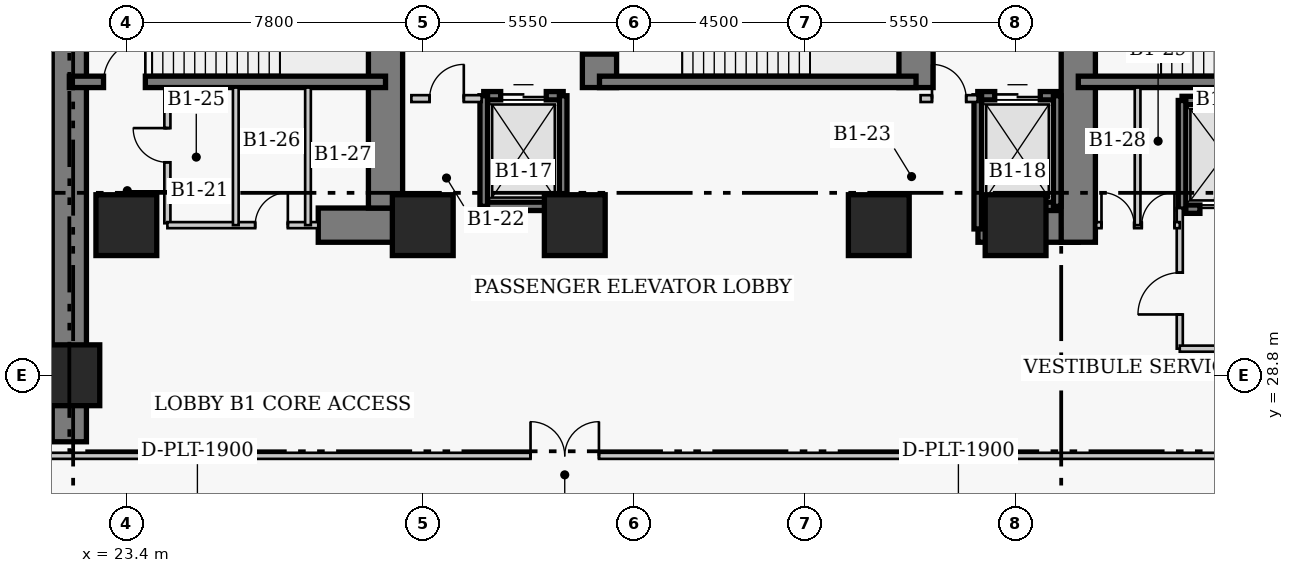
"""IFC4 building model, lengths in metres.
Left out: names, types, materials, properties, quantities, classifications, styles, units other than length and angle.
Written with IfcOpenShell. Run it as: python <this file> out.ifc"""

import sys

from ifc_helpers import new_model, si_unit, direction, frame, frame_2d, origin, origin_2d, place, context, subcontext, project, spatial, rectangle, extrude, element, fill, save


model = new_model("IFC4")
c1 = context("Model", 3, precision=1e-05, world=origin(), true_north=direction((0.0, 1.0)))
c2 = subcontext(c1, "Body", "Model", "MODEL_VIEW")
j1 = project(units=[si_unit("LENGTHUNIT", "METRE"), si_unit("PLANEANGLEUNIT", "RADIAN")], contexts=[c1])
p1 = place(None, origin())
s1 = spatial("IfcSite", under=j1, at=p1, CompositionType="ELEMENT")
p2 = place(p1, origin())
s2 = spatial("IfcBuilding", under=s1, at=p2, CompositionType="ELEMENT")
p3 = place(p2, frame((0.0, 0.0, -4.5)))
s3 = spatial("IfcBuildingStorey", under=s2, at=p3, CompositionType="ELEMENT", Elevation=-4.5)
p4 = place(p3, frame((21.9, 27.05, 0.0), z_axis=(0.0, 0.0, 1.0), x_axis=(0.0, 1.0, 0.0)))
e1 = element("IfcWall", 1, at=p4, inside=s3, PredefinedType="SHEAR", context=c2, shape_type="SweptSolid", body=[
    extrude(rectangle(XDim=13.72, YDim=0.9, at=frame_2d((6.86, 0.0))), origin(), (0.0, 0.0, 1.0), 4.5),
])
p5 = place(p3, frame((28.45, 32.75, 0.0), z_axis=(0.0, 0.0, 1.0), x_axis=(1.0, 0.0, 0.0)))
e2 = element("IfcWall", 2, at=p5, inside=s3, PredefinedType="SHEAR", context=c2, shape_type="SweptSolid", body=[
    extrude(rectangle(XDim=2.4, YDim=0.9, at=frame_2d((1.2, 0.0))), origin(), (0.0, 0.0, 1.0), 4.5),
])
p6 = place(p3, frame((45.81, 32.75, 0.0), z_axis=(0.0, 0.0, 1.0), x_axis=(1.0, 0.0, 0.0)))
e3 = element("IfcWall", 3, at=p6, inside=s3, PredefinedType="SHEAR", context=c2, shape_type="SweptSolid", body=[
    extrude(rectangle(XDim=2.64, YDim=0.9, at=frame_2d((1.32, 0.0))), origin(), (0.0, 0.0, 1.0), 4.5),
])
p7 = place(p3, frame((30.22, 33.2, 0.0), z_axis=(0.0, 0.0, 1.0), x_axis=(0.0, 1.0, 0.0)))
e4 = element("IfcWall", 4, at=p7, inside=s3, PredefinedType="SHEAR", context=c2, shape_type="SweptSolid", body=[
    extrude(rectangle(XDim=7.12, YDim=0.9, at=frame_2d((3.56, 0.0))), origin(), (0.0, 0.0, 1.0), 4.5),
])
p8 = place(p3, frame((35.85, 36.37, 0.0), z_axis=(0.0, 0.0, 1.0), x_axis=(0.0, 1.0, 0.0)))
e5 = element("IfcWall", 5, at=p8, inside=s3, PredefinedType="SHEAR", context=c2, shape_type="SweptSolid", body=[
    extrude(rectangle(XDim=3.95, YDim=0.9, at=frame_2d((1.975, 0.0))), origin(), (0.0, 0.0, 1.0), 4.5),
])
p9 = place(p8, frame((0.88, 0.0, 0.0)))
e6 = element("IfcOpeningElement", 6, at=p9, cuts=e5, PredefinedType="OPENING", context=c2, shape_type="SweptSolid", body=[
    extrude(rectangle(XDim=1.1, YDim=2.15, at=frame_2d((0.55, 1.075))), frame((0.0, 0.46, 0.0), z_axis=(0.0, -1.0, 0.0), x_axis=(1.0, 0.0, 0.0)), (0.0, 0.0, 1.0), 0.92),
])
p10 = place(p3, frame((44.18, 36.37, 0.0), z_axis=(0.0, 0.0, 1.0), x_axis=(0.0, 1.0, 0.0)))
e7 = element("IfcWall", 7, at=p10, inside=s3, PredefinedType="SHEAR", context=c2, shape_type="SweptSolid", body=[
    extrude(rectangle(XDim=3.95, YDim=0.9, at=frame_2d((1.975, 0.0))), origin(), (0.0, 0.0, 1.0), 4.5),
])
p11 = place(p3, frame((48.45, 32.3, 0.0), z_axis=(0.0, 0.0, 1.0), x_axis=(0.0, 1.0, 0.0)))
e8 = element("IfcWall", 8, at=p11, inside=s3, PredefinedType="SHEAR", context=c2, shape_type="SweptSolid", body=[
    extrude(rectangle(XDim=8.02, YDim=0.9, at=frame_2d((4.01, 0.0))), origin(), (0.0, 0.0, 1.0), 4.5),
])
p12 = place(p11, frame((5.9, 0.0, 0.0)))
e9 = element("IfcOpeningElement", 9, at=p12, cuts=e8, PredefinedType="OPENING", context=c2, shape_type="SweptSolid", body=[
    extrude(rectangle(XDim=1.1, YDim=2.15, at=frame_2d((0.55, 1.075))), frame((0.0, 0.46, 0.0), z_axis=(0.0, -1.0, 0.0), x_axis=(1.0, 0.0, 0.0)), (0.0, 0.0, 1.0), 0.92),
])
p13 = place(p3, frame((21.9, 36.52, 0.0), z_axis=(0.0, 0.0, 1.0), x_axis=(1.0, 0.0, 0.0)))
e10 = element("IfcWall", 10, at=p13, inside=s3, PredefinedType="SHEAR", context=c2, shape_type="SweptSolid", body=[
    extrude(rectangle(XDim=8.32, YDim=0.3, at=frame_2d((4.16, 0.0))), origin(), (0.0, 0.0, 1.0), 4.5),
])
p14 = place(p13, frame((0.9, 0.0, 0.0)))
e11 = element("IfcOpeningElement", 11, at=p14, cuts=e10, PredefinedType="OPENING", context=c2, shape_type="SweptSolid", body=[
    extrude(rectangle(XDim=1.1, YDim=2.15, at=frame_2d((0.55, 1.075))), frame((0.0, 0.16, 0.0), z_axis=(0.0, -1.0, 0.0), x_axis=(1.0, 0.0, 0.0)), (0.0, 0.0, 1.0), 0.32),
])
p15 = place(p3, frame((35.85, 36.52, 0.0), z_axis=(0.0, 0.0, 1.0), x_axis=(1.0, 0.0, 0.0)))
e12 = element("IfcWall", 12, at=p15, inside=s3, PredefinedType="SHEAR", context=c2, shape_type="SweptSolid", body=[
    extrude(rectangle(XDim=8.33, YDim=0.3, at=frame_2d((4.165, 0.0))), origin(), (0.0, 0.0, 1.0), 4.5),
])
p16 = place(p3, frame((48.45, 36.52, 0.0), z_axis=(0.0, 0.0, 1.0), x_axis=(1.0, 0.0, 0.0)))
e13 = element("IfcWall", 13, at=p16, inside=s3, PredefinedType="SHEAR", context=c2, shape_type="SweptSolid", body=[
    extrude(rectangle(XDim=8.52, YDim=0.3, at=frame_2d((4.26, 0.0))), origin(), (0.0, 0.0, 1.0), 4.5),
])
for number, where, z_axis, x_axis in (
    (14, (21.9, 28.8, 0.0), (0.0, 0.0, 1.0), (1.0, 0.0, 0.0)),
    (15, (23.4, 32.75, 0.0), (0.0, 0.0, 1.0), (1.0, 0.0, 0.0)),
    (16, (31.2, 32.75, 0.0), (0.0, 0.0, 1.0), (1.0, 0.0, 0.0)),
    (17, (35.2, 32.75, 0.0), (0.0, 0.0, 1.0), (1.0, 0.0, 0.0)),
    (18, (43.2, 32.75, 0.0), (0.0, 0.0, 1.0), (1.0, 0.0, 0.0)),
    (19, (46.8, 32.75, 0.0), (0.0, 0.0, 1.0), (1.0, 0.0, 0.0)),
):
    element("IfcColumn", number, at=place(p3, frame(where, z_axis=z_axis, x_axis=x_axis)), inside=s3, PredefinedType="COLUMN", context=c2, shape_type="SweptSolid", body=[
        extrude(rectangle(XDim=1.6, YDim=1.6, at=origin_2d()), origin(), (0.0, 0.0, 1.0), 4.5),
    ])
p17 = place(p3, frame((51.18, 36.03, 0.0), z_axis=(0.0, 0.0, 1.0), x_axis=(1.0, 0.0, 0.0)))
e20 = element("IfcWall", 20, at=p17, inside=s3, PredefinedType="SHEAR", context=c2, shape_type="SweptSolid", body=[
    extrude(rectangle(XDim=2.42, YDim=0.22, at=frame_2d((1.21, 0.0))), origin(), (0.0, 0.0, 1.0), 4.5),
])
p18 = place(p3, frame((51.18, 33.17, 0.0), z_axis=(0.0, 0.0, 1.0), x_axis=(1.0, 0.0, 0.0)))
e21 = element("IfcWall", 21, at=p18, inside=s3, PredefinedType="SHEAR", context=c2, shape_type="SweptSolid", body=[
    extrude(rectangle(XDim=2.42, YDim=0.22, at=frame_2d((1.21, 0.0))), origin(), (0.0, 0.0, 1.0), 4.5),
])
p19 = place(p18, frame((0.47, 0.0, 0.0)))
e22 = element("IfcOpeningElement", 22, at=p19, cuts=e21, PredefinedType="OPENING", context=c2, shape_type="SweptSolid", body=[
    extrude(rectangle(XDim=1.3, YDim=2.15, at=frame_2d((0.65, 1.075))), frame((0.0, 0.12, 0.0), z_axis=(0.0, -1.0, 0.0), x_axis=(1.0, 0.0, 0.0)), (0.0, 0.0, 1.0), 0.24),
])
p20 = place(p3, frame((51.18, 33.17, 0.0), z_axis=(0.0, 0.0, 1.0), x_axis=(0.0, 1.0, 0.0)))
e23 = element("IfcWall", 23, at=p20, inside=s3, PredefinedType="SHEAR", context=c2, shape_type="SweptSolid", body=[
    extrude(rectangle(XDim=2.86, YDim=0.2, at=frame_2d((1.43, 0.0))), origin(), (0.0, 0.0, 1.0), 4.5),
])
p21 = place(p3, frame((32.805, 36.155, 0.0), z_axis=(0.0, 0.0, 1.0), x_axis=(1.0, 0.0, 0.0)))
e24 = element("IfcWall", 24, at=p21, inside=s3, PredefinedType="SHEAR", context=c2, shape_type="SweptSolid", body=[
    extrude(rectangle(XDim=2.09, YDim=0.22, at=frame_2d((1.045, 0.0))), origin(), (0.0, 0.0, 1.0), 4.5),
])
p22 = place(p21, frame((0.445, 0.0, 0.0)))
e25 = element("IfcOpeningElement", 25, at=p22, cuts=e24, PredefinedType="OPENING", context=c2, shape_type="SweptSolid", body=[
    extrude(rectangle(XDim=1.2, YDim=2.15, at=frame_2d((0.6, 1.075))), frame((0.0, 0.12, 0.0), z_axis=(0.0, -1.0, 0.0), x_axis=(1.0, 0.0, 0.0)), (0.0, 0.0, 1.0), 0.24),
])
p23 = place(p3, frame((32.805, 33.245, 0.0), z_axis=(0.0, 0.0, 1.0), x_axis=(1.0, 0.0, 0.0)))
e26 = element("IfcWall", 26, at=p23, inside=s3, PredefinedType="SHEAR", context=c2, shape_type="SweptSolid", body=[
    extrude(rectangle(XDim=2.09, YDim=0.22, at=frame_2d((1.045, 0.0))), origin(), (0.0, 0.0, 1.0), 4.5),
])
for number, where, z_axis, x_axis in (
    (27, (32.805, 33.245, 0.0), (0.0, 0.0, 1.0), (0.0, 1.0, 0.0)),
    (28, (34.895, 33.245, 0.0), (0.0, 0.0, 1.0), (0.0, 1.0, 0.0)),
):
    element("IfcWall", number, at=place(p3, frame(where, z_axis=z_axis, x_axis=x_axis)), inside=s3, PredefinedType="SHEAR", context=c2, shape_type="SweptSolid", body=[
        extrude(rectangle(XDim=2.91, YDim=0.2, at=frame_2d((1.455, 0.0))), origin(), (0.0, 0.0, 1.0), 4.5),
    ])
p24 = place(p3, frame((45.805, 36.155, 0.0), z_axis=(0.0, 0.0, 1.0), x_axis=(1.0, 0.0, 0.0)))
e29 = element("IfcWall", 29, at=p24, inside=s3, PredefinedType="SHEAR", context=c2, shape_type="SweptSolid", body=[
    extrude(rectangle(XDim=2.09, YDim=0.22, at=frame_2d((1.045, 0.0))), origin(), (0.0, 0.0, 1.0), 4.5),
])
p25 = place(p24, frame((0.445, 0.0, 0.0)))
e30 = element("IfcOpeningElement", 30, at=p25, cuts=e29, PredefinedType="OPENING", context=c2, shape_type="SweptSolid", body=[
    extrude(rectangle(XDim=1.2, YDim=2.15, at=frame_2d((0.6, 1.075))), frame((0.0, 0.12, 0.0), z_axis=(0.0, -1.0, 0.0), x_axis=(1.0, 0.0, 0.0)), (0.0, 0.0, 1.0), 0.24),
])
p26 = place(p3, frame((45.805, 33.245, 0.0), z_axis=(0.0, 0.0, 1.0), x_axis=(1.0, 0.0, 0.0)))
e31 = element("IfcWall", 31, at=p26, inside=s3, PredefinedType="SHEAR", context=c2, shape_type="SweptSolid", body=[
    extrude(rectangle(XDim=2.09, YDim=0.22, at=frame_2d((1.045, 0.0))), origin(), (0.0, 0.0, 1.0), 4.5),
])
p27 = place(p3, frame((45.805, 32.65, 0.0), z_axis=(0.0, 0.0, 1.0), x_axis=(0.0, 1.0, 0.0)))
e32 = element("IfcWall", 32, at=p27, inside=s3, PredefinedType="SHEAR", context=c2, shape_type="SweptSolid", body=[
    extrude(rectangle(XDim=3.505, YDim=0.2, at=frame_2d((1.752, 0.0))), origin(), (0.0, 0.0, 1.0), 4.5),
])
p28 = place(p3, frame((47.895, 33.245, 0.0), z_axis=(0.0, 0.0, 1.0), x_axis=(0.0, 1.0, 0.0)))
e33 = element("IfcWall", 33, at=p28, inside=s3, PredefinedType="SHEAR", context=c2, shape_type="SweptSolid", body=[
    extrude(rectangle(XDim=2.91, YDim=0.2, at=frame_2d((1.455, 0.0))), origin(), (0.0, 0.0, 1.0), 4.5),
])
p29 = place(p3, frame((30.9, 36.08, 0.0), z_axis=(0.0, 0.0, 1.0), x_axis=(1.0, 0.0, 0.0)))
e34 = element("IfcWall", 34, at=p29, inside=s3, PredefinedType="PARTITIONING", context=c2, shape_type="SweptSolid", body=[
    extrude(rectangle(XDim=1.85, YDim=0.18, at=frame_2d((0.925, 0.0))), origin(), (0.0, 0.0, 1.0), 4.15),
])
p30 = place(p29, frame((0.48, 0.0, 0.0)))
e35 = element("IfcOpeningElement", 35, at=p30, cuts=e34, PredefinedType="OPENING", context=c2, shape_type="SweptSolid", body=[
    extrude(rectangle(XDim=0.9, YDim=2.15, at=frame_2d((0.45, 1.075))), frame((0.0, 0.1, 0.0), z_axis=(0.0, -1.0, 0.0), x_axis=(1.0, 0.0, 0.0)), (0.0, 0.0, 1.0), 0.2),
])
p31 = place(p3, frame((44.3, 36.08, 0.0), z_axis=(0.0, 0.0, 1.0), x_axis=(1.0, 0.0, 0.0)))
e36 = element("IfcWall", 36, at=p31, inside=s3, PredefinedType="PARTITIONING", context=c2, shape_type="SweptSolid", body=[
    extrude(rectangle(XDim=1.5, YDim=0.18, at=frame_2d((0.75, 0.0))), origin(), (0.0, 0.0, 1.0), 4.15),
])
p32 = place(p31, frame((0.3, 0.0, 0.0)))
e37 = element("IfcOpeningElement", 37, at=p32, cuts=e36, PredefinedType="OPENING", context=c2, shape_type="SweptSolid", body=[
    extrude(rectangle(XDim=0.9, YDim=2.15, at=frame_2d((0.45, 1.075))), frame((0.0, 0.1, 0.0), z_axis=(0.0, -1.0, 0.0), x_axis=(1.0, 0.0, 0.0)), (0.0, 0.0, 1.0), 0.2),
])
p33 = place(p3, frame((24.48, 32.8, 0.0), z_axis=(0.0, 0.0, 1.0), x_axis=(0.0, 1.0, 0.0)))
e38 = element("IfcWall", 38, at=p33, inside=s3, PredefinedType="PARTITIONING", context=c2, shape_type="SweptSolid", body=[
    extrude(rectangle(XDim=3.57, YDim=0.16, at=frame_2d((1.785, 0.0))), origin(), (0.0, 0.0, 1.0), 4.15),
])
p34 = place(p33, frame((1.604, 0.0, 0.0)))
e39 = element("IfcOpeningElement", 39, at=p34, cuts=e38, PredefinedType="OPENING", context=c2, shape_type="SweptSolid", body=[
    extrude(rectangle(XDim=0.9, YDim=2.1, at=frame_2d((0.45, 1.05))), frame((0.0, 0.09, 0.0), z_axis=(0.0, -1.0, 0.0), x_axis=(1.0, 0.0, 0.0)), (0.0, 0.0, 1.0), 0.18),
])
p35 = place(p3, frame((51.12, 29.5, 0.0), z_axis=(0.0, 0.0, 1.0), x_axis=(0.0, 1.0, 0.0)))
e40 = element("IfcWall", 40, at=p35, inside=s3, PredefinedType="PARTITIONING", context=c2, shape_type="SweptSolid", body=[
    extrude(rectangle(XDim=3.7, YDim=0.16, at=frame_2d((1.85, 0.0))), origin(), (0.0, 0.0, 1.0), 4.15),
])
p36 = place(p35, frame((0.9, 0.0, 0.0)))
e41 = element("IfcOpeningElement", 41, at=p36, cuts=e40, PredefinedType="OPENING", context=c2, shape_type="SweptSolid", body=[
    extrude(rectangle(XDim=1.1, YDim=2.15, at=frame_2d((0.55, 1.075))), frame((0.0, 0.09, 0.0), z_axis=(0.0, -1.0, 0.0), x_axis=(1.0, 0.0, 0.0)), (0.0, 0.0, 1.0), 0.18),
])
p37 = place(p3, frame((51.12, 29.5, 0.0), z_axis=(0.0, 0.0, 1.0), x_axis=(1.0, 0.0, 0.0)))
e42 = element("IfcWall", 42, at=p37, inside=s3, PredefinedType="PARTITIONING", context=c2, shape_type="SweptSolid", body=[
    extrude(rectangle(XDim=5.63, YDim=0.16, at=frame_2d((2.815, 0.0))), origin(), (0.0, 0.0, 1.0), 4.15),
])
p38 = place(p3, frame((24.48, 32.75, 0.0), z_axis=(0.0, 0.0, 1.0), x_axis=(1.0, 0.0, 0.0)))
e43 = element("IfcWall", 43, at=p38, inside=s3, PredefinedType="PARTITIONING", context=c2, shape_type="SweptSolid", body=[
    extrude(rectangle(XDim=3.97, YDim=0.16, at=frame_2d((1.985, 0.0))), origin(), (0.0, 0.0, 1.0), 4.15),
])
p39 = place(p38, frame((2.31, 0.0, 0.0)))
e44 = element("IfcOpeningElement", 44, at=p39, cuts=e43, PredefinedType="OPENING", context=c2, shape_type="SweptSolid", body=[
    extrude(rectangle(XDim=0.86, YDim=2.05, at=frame_2d((0.43, 1.025))), frame((0.0, 0.09, 0.0), z_axis=(0.0, -1.0, 0.0), x_axis=(1.0, 0.0, 0.0)), (0.0, 0.0, 1.0), 0.18),
])
p40 = place(p3, frame((48.92, 32.75, 0.0), z_axis=(0.0, 0.0, 1.0), x_axis=(1.0, 0.0, 0.0)))
e45 = element("IfcWall", 45, at=p40, inside=s3, PredefinedType="PARTITIONING", context=c2, shape_type="SweptSolid", body=[
    extrude(rectangle(XDim=2.2, YDim=0.16, at=frame_2d((1.1, 0.0))), origin(), (0.0, 0.0, 1.0), 4.15),
])
p41 = place(p40, frame((0.14, 0.0, 0.0)))
e46 = element("IfcOpeningElement", 46, at=p41, cuts=e45, PredefinedType="OPENING", context=c2, shape_type="SweptSolid", body=[
    extrude(rectangle(XDim=0.86, YDim=2.05, at=frame_2d((0.43, 1.025))), frame((0.0, 0.09, 0.0), z_axis=(0.0, -1.0, 0.0), x_axis=(1.0, 0.0, 0.0)), (0.0, 0.0, 1.0), 0.18),
])
p42 = place(p40, frame((1.2, 0.0, 0.0)))
e47 = element("IfcOpeningElement", 47, at=p42, cuts=e45, PredefinedType="OPENING", context=c2, shape_type="SweptSolid", body=[
    extrude(rectangle(XDim=0.86, YDim=2.05, at=frame_2d((0.43, 1.025))), frame((0.0, 0.09, 0.0), z_axis=(0.0, -1.0, 0.0), x_axis=(1.0, 0.0, 0.0)), (0.0, 0.0, 1.0), 0.18),
])
for number, where, z_axis, x_axis in (
    (48, (26.28, 32.75, 0.0), (0.0, 0.0, 1.0), (0.0, 1.0, 0.0)),
    (49, (28.18, 32.75, 0.0), (0.0, 0.0, 1.0), (0.0, 1.0, 0.0)),
    (50, (50.01, 32.75, 0.0), (0.0, 0.0, 1.0), (0.0, 1.0, 0.0)),
):
    element("IfcWall", number, at=place(p3, frame(where, z_axis=z_axis, x_axis=x_axis)), inside=s3, PredefinedType="PARTITIONING", context=c2, shape_type="SweptSolid", body=[
        extrude(rectangle(XDim=3.62, YDim=0.15, at=frame_2d((1.81, 0.0))), origin(), (0.0, 0.0, 1.0), 4.15),
    ])
p43 = place(p3, frame((-2.98, 26.68, 0.0), z_axis=(0.0, 0.0, 1.0), x_axis=(1.0, 0.0, 0.0)))
e51 = element("IfcWall", 51, at=p43, inside=s3, PredefinedType="PARTITIONING", context=c2, shape_type="SweptSolid", body=[
    extrude(rectangle(XDim=83.96, YDim=0.16, at=frame_2d((41.98, 0.0))), origin(), (0.0, 0.0, 1.0), 4.15),
])
p44 = place(p43, frame((37.016, 0.0, 0.0)))
e52 = element("IfcOpeningElement", 52, at=p44, cuts=e51, PredefinedType="OPENING", context=c2, shape_type="SweptSolid", body=[
    extrude(rectangle(XDim=1.8, YDim=2.2, at=frame_2d((0.9, 1.1))), frame((0.0, 0.09, 0.0), z_axis=(0.0, -1.0, 0.0), x_axis=(1.0, 0.0, 0.0)), (0.0, 0.0, 1.0), 0.18),
])
p45 = place(p43, frame((1.2, 0.0, 0.0)))
e53 = element("IfcOpeningElement", 53, at=p45, cuts=e51, PredefinedType="OPENING", context=c2, shape_type="SweptSolid", body=[
    extrude(rectangle(XDim=1.05, YDim=2.15, at=frame_2d((0.525, 1.075))), frame((0.0, 0.09, 0.0), z_axis=(0.0, -1.0, 0.0), x_axis=(1.0, 0.0, 0.0)), (0.0, 0.0, 1.0), 0.18),
])
p46 = place(p43, frame((21.675, 0.0, 0.0)))
e54 = element("IfcOpeningElement", 54, at=p46, cuts=e51, PredefinedType="OPENING", context=c2, shape_type="SweptSolid", body=[
    extrude(rectangle(XDim=1.05, YDim=2.15, at=frame_2d((0.525, 1.075))), frame((0.0, 0.09, 0.0), z_axis=(0.0, -1.0, 0.0), x_axis=(1.0, 0.0, 0.0)), (0.0, 0.0, 1.0), 0.18),
])
p47 = place(p43, frame((70.925, 0.0, 0.0)))
e55 = element("IfcOpeningElement", 55, at=p47, cuts=e51, PredefinedType="OPENING", context=c2, shape_type="SweptSolid", body=[
    extrude(rectangle(XDim=1.05, YDim=2.15, at=frame_2d((0.525, 1.075))), frame((0.0, 0.09, 0.0), z_axis=(0.0, -1.0, 0.0), x_axis=(1.0, 0.0, 0.0)), (0.0, 0.0, 1.0), 0.18),
])
p48 = place(p19, origin())
e56 = element("IfcDoor", 56, at=p48, inside=s3, OperationType="DOUBLE_DOOR_SLIDING", PredefinedType="DOOR", context=c2, shape_type="SweptSolid", body=[
    extrude(rectangle(XDim=1.3, YDim=2.15, at=frame_2d((0.65, 1.075))), frame((0.0, 0.025, 0.0), z_axis=(0.0, -1.0, 0.0), x_axis=(1.0, 0.0, 0.0)), (0.0, 0.0, 1.0), 0.05),
])
fill(e22, e56)
p49 = place(p22, origin())
e57 = element("IfcDoor", 57, at=p49, inside=s3, OperationType="DOUBLE_DOOR_SLIDING", PredefinedType="DOOR", context=c2, shape_type="SweptSolid", body=[
    extrude(rectangle(XDim=1.2, YDim=2.15, at=frame_2d((0.6, 1.075))), frame((0.0, 0.025, 0.0), z_axis=(0.0, -1.0, 0.0), x_axis=(1.0, 0.0, 0.0)), (0.0, 0.0, 1.0), 0.05),
])
fill(e25, e57)
p50 = place(p25, origin())
e58 = element("IfcDoor", 58, at=p50, inside=s3, OperationType="DOUBLE_DOOR_SLIDING", PredefinedType="DOOR", context=c2, shape_type="SweptSolid", body=[
    extrude(rectangle(XDim=1.2, YDim=2.15, at=frame_2d((0.6, 1.075))), frame((0.0, 0.025, 0.0), z_axis=(0.0, -1.0, 0.0), x_axis=(1.0, 0.0, 0.0)), (0.0, 0.0, 1.0), 0.05),
])
fill(e30, e58)
p51 = place(p30, origin())
e59 = element("IfcDoor", 59, at=p51, inside=s3, OperationType="SINGLE_SWING_RIGHT", PredefinedType="DOOR", context=c2, shape_type="SweptSolid", body=[
    extrude(rectangle(XDim=0.9, YDim=2.15, at=frame_2d((0.45, 1.075))), frame((0.0, 0.025, 0.0), z_axis=(0.0, -1.0, 0.0), x_axis=(1.0, 0.0, 0.0)), (0.0, 0.0, 1.0), 0.05),
])
fill(e35, e59)
p52 = place(p32, origin())
e60 = element("IfcDoor", 60, at=p52, inside=s3, OperationType="SINGLE_SWING_LEFT", PredefinedType="DOOR", context=c2, shape_type="SweptSolid", body=[
    extrude(rectangle(XDim=0.9, YDim=2.15, at=frame_2d((0.45, 1.075))), frame((0.0, 0.025, 0.0), z_axis=(0.0, -1.0, 0.0), x_axis=(1.0, 0.0, 0.0)), (0.0, 0.0, 1.0), 0.05),
])
fill(e37, e60)
p53 = place(p36, origin())
e61 = element("IfcDoor", 61, at=p53, inside=s3, OperationType="SINGLE_SWING_LEFT", PredefinedType="DOOR", context=c2, shape_type="SweptSolid", body=[
    extrude(rectangle(XDim=1.1, YDim=2.15, at=frame_2d((0.55, 1.075))), frame((0.0, 0.025, 0.0), z_axis=(0.0, -1.0, 0.0), x_axis=(1.0, 0.0, 0.0)), (0.0, 0.0, 1.0), 0.05),
])
fill(e41, e61)
p54 = place(p34, origin())
e62 = element("IfcDoor", 62, at=p54, inside=s3, OperationType="SINGLE_SWING_RIGHT", PredefinedType="DOOR", context=c2, shape_type="SweptSolid", body=[
    extrude(rectangle(XDim=0.9, YDim=2.1, at=frame_2d((0.45, 1.05))), frame((0.0, 0.025, 0.0), z_axis=(0.0, -1.0, 0.0), x_axis=(1.0, 0.0, 0.0)), (0.0, 0.0, 1.0), 0.05),
])
fill(e39, e62)
p55 = place(p39, origin())
e63 = element("IfcDoor", 63, at=p55, inside=s3, OperationType="SINGLE_SWING_RIGHT", PredefinedType="DOOR", context=c2, shape_type="SweptSolid", body=[
    extrude(rectangle(XDim=0.86, YDim=2.05, at=frame_2d((0.43, 1.025))), frame((0.0, 0.025, 0.0), z_axis=(0.0, -1.0, 0.0), x_axis=(1.0, 0.0, 0.0)), (0.0, 0.0, 1.0), 0.05),
])
fill(e44, e63)
p56 = place(p41, origin())
e64 = element("IfcDoor", 64, at=p56, inside=s3, OperationType="SINGLE_SWING_LEFT", PredefinedType="DOOR", context=c2, shape_type="SweptSolid", body=[
    extrude(rectangle(XDim=0.86, YDim=2.05, at=frame_2d((0.43, 1.025))), frame((0.0, 0.025, 0.0), z_axis=(0.0, -1.0, 0.0), x_axis=(1.0, 0.0, 0.0)), (0.0, 0.0, 1.0), 0.05),
])
fill(e46, e64)
p57 = place(p42, origin())
e65 = element("IfcDoor", 65, at=p57, inside=s3, OperationType="SINGLE_SWING_RIGHT", PredefinedType="DOOR", context=c2, shape_type="SweptSolid", body=[
    extrude(rectangle(XDim=0.86, YDim=2.05, at=frame_2d((0.43, 1.025))), frame((0.0, 0.025, 0.0), z_axis=(0.0, -1.0, 0.0), x_axis=(1.0, 0.0, 0.0)), (0.0, 0.0, 1.0), 0.05),
])
fill(e47, e65)
p58 = place(p44, origin())
e66 = element("IfcDoor", 66, at=p58, inside=s3, OperationType="DOUBLE_DOOR_SINGLE_SWING", PredefinedType="DOOR", context=c2, shape_type="SweptSolid", body=[
    extrude(rectangle(XDim=1.8, YDim=2.2, at=frame_2d((0.9, 1.1))), frame((0.0, 0.025, 0.0), z_axis=(0.0, -1.0, 0.0), x_axis=(1.0, 0.0, 0.0)), (0.0, 0.0, 1.0), 0.05),
])
fill(e52, e66)
p59 = place(p14, origin())
e67 = element("IfcDoor", 67, at=p59, inside=s3, OperationType="SINGLE_SWING_RIGHT", PredefinedType="DOOR", context=c2, shape_type="SweptSolid", body=[
    extrude(rectangle(XDim=1.1, YDim=2.15, at=frame_2d((0.55, 1.075))), frame((0.0, 0.025, 0.0), z_axis=(0.0, -1.0, 0.0), x_axis=(1.0, 0.0, 0.0)), (0.0, 0.0, 1.0), 0.05),
])
fill(e11, e67)
p60 = place(p9, origin())
e68 = element("IfcDoor", 68, at=p60, inside=s3, OperationType="SINGLE_SWING_RIGHT", PredefinedType="DOOR", context=c2, shape_type="SweptSolid", body=[
    extrude(rectangle(XDim=1.1, YDim=2.15, at=frame_2d((0.55, 1.075))), frame((0.0, 0.025, 0.0), z_axis=(0.0, -1.0, 0.0), x_axis=(1.0, 0.0, 0.0)), (0.0, 0.0, 1.0), 0.05),
])
fill(e6, e68)
save(model, sys.argv[1])
